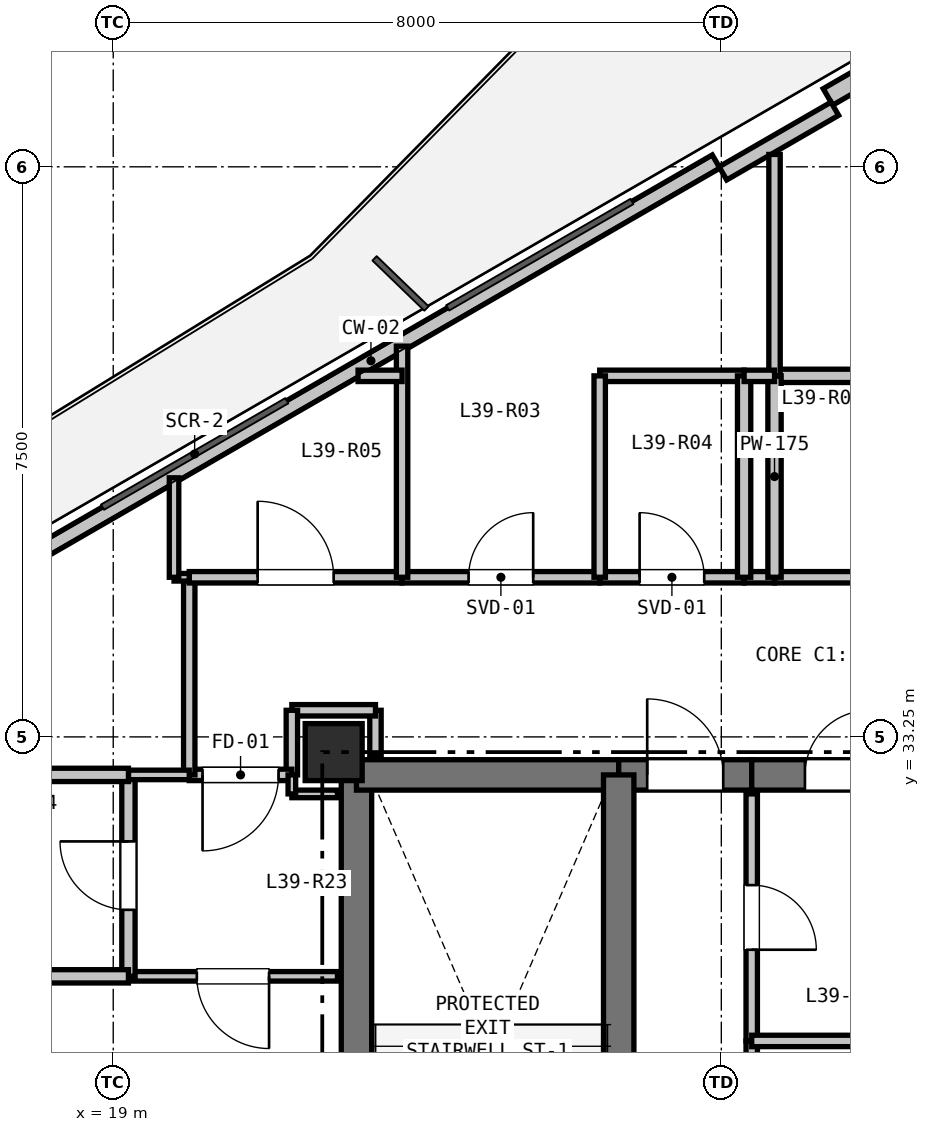
"""IFC4 building model, lengths in metres.
Left out: names, types, materials, properties, quantities, classifications, styles, units other than length and angle.
Written with IfcOpenShell. Run it as: python <this file> out.ifc"""

import sys

from ifc_helpers import new_model, si_unit, direction, frame, frame_2d, origin, origin_2d, place, context, subcontext, project, spatial, rectangle, extrude, element, fill, save


model = new_model("IFC4")
c1 = context("Model", 3, precision=1e-05, world=origin(), true_north=direction((0.0, 1.0)))
c2 = subcontext(c1, "Body", "Model", "MODEL_VIEW")
j1 = project(units=[si_unit("LENGTHUNIT", "METRE"), si_unit("PLANEANGLEUNIT", "RADIAN")], contexts=[c1])
p1 = place(None, origin())
s1 = spatial("IfcSite", under=j1, at=p1, CompositionType="ELEMENT")
p2 = place(p1, origin())
s2 = spatial("IfcBuilding", under=s1, at=p2, CompositionType="ELEMENT")
p3 = place(p2, frame((0.0, 0.0, 141.0)))
s3 = spatial("IfcBuildingStorey", under=s2, at=p3, CompositionType="ELEMENT", Elevation=141.0)
p4 = place(p3, frame((21.9, 33.05, 0.0), z_axis=(0.0, 0.0, 1.0), x_axis=(1.0, 0.0, 0.0)))
e1 = element("IfcColumn", 1, at=p4, inside=s3, PredefinedType="COLUMN", context=c2, shape_type="SweptSolid", body=[
    extrude(rectangle(XDim=0.75, YDim=0.75, at=origin_2d()), origin(), (0.0, 0.0, 1.0), 3.3),
])
p5 = place(p3, frame((17.85, 35.577, 0.0), z_axis=(0.0, 0.0, 1.0), x_axis=(0.866026619769, 0.499997893847, 0.0)))
e2 = element("IfcWall", 2, at=p5, inside=s3, PredefinedType="PARAPET", context=c2, shape_type="SweptSolid", body=[
    extrude(rectangle(XDim=10.486, YDim=0.2, at=frame_2d((5.243, 0.0))), origin(), (0.0, 0.0, 1.0), 0.2),
])
p6 = place(p3, frame((28.403, 41.67, 0.0), z_axis=(0.0, 0.0, 1.0), x_axis=(0.86602239209, 0.500005216371, 0.0)))
e3 = element("IfcWall", 3, at=p6, inside=s3, PredefinedType="SOLIDWALL", context=c2, shape_type="SweptSolid", body=[
    extrude(rectangle(XDim=11.186, YDim=0.25, at=frame_2d((5.593, 0.0))), origin(), (0.0, 0.0, 1.0), 2.68),
])
p7 = place(p6, frame((2.88, 0.0, 0.9)))
e4 = element("IfcOpeningElement", 4, at=p7, cuts=e3, PredefinedType="OPENING", context=c2, shape_type="SweptSolid", body=[
    extrude(rectangle(XDim=0.9, YDim=1.4, at=frame_2d((0.45, 0.7))), frame((0.0, 0.135, 0.0), z_axis=(0.0, -1.0, 0.0), x_axis=(1.0, 0.0, 0.0)), (0.0, 0.0, 1.0), 0.27),
])
p8 = place(p3, frame((27.021, 40.664, 0.0), z_axis=(0.0, 0.0, 1.0), x_axis=(0.86605165483, 0.499954529098, 0.0)))
e5 = element("IfcWall", 5, at=p8, inside=s3, PredefinedType="PARAPET", context=c2, shape_type="SweptSolid", body=[
    extrude(rectangle(XDim=1.7, YDim=0.2, at=frame_2d((0.85, 0.0))), origin(), (0.0, 0.0, 1.0), 2.68),
])
p9 = place(p3, frame((22.2, 25.4, 0.0), z_axis=(0.0, 0.0, 1.0), x_axis=(0.0, 1.0, 0.0)))
e6 = element("IfcWall", 6, at=p9, inside=s3, PredefinedType="SHEAR", context=c2, shape_type="SweptSolid", body=[
    extrude(rectangle(XDim=7.35, YDim=0.4, at=frame_2d((3.675, 0.0))), origin(), (0.0, 0.0, 1.0), 3.06),
])
p10 = place(p3, frame((22.2, 32.75, 0.0), z_axis=(0.0, 0.0, 1.0), x_axis=(1.0, 0.0, 0.0)))
e7 = element("IfcWall", 7, at=p10, inside=s3, PredefinedType="SHEAR", context=c2, shape_type="SweptSolid", body=[
    extrude(rectangle(XDim=3.45, YDim=0.4, at=frame_2d((1.725, 0.0))), origin(), (0.0, 0.0, 1.0), 3.06),
])
p11 = place(p3, frame((25.65, 32.75, 0.0), z_axis=(0.0, 0.0, 1.0), x_axis=(1.0, 0.0, 0.0)))
e8 = element("IfcWall", 8, at=p11, inside=s3, PredefinedType="SHEAR", context=c2, shape_type="SweptSolid", body=[
    extrude(rectangle(XDim=1.75, YDim=0.4, at=frame_2d((0.875, 0.0))), origin(), (0.0, 0.0, 1.0), 3.06),
])
p12 = place(p11, frame((0.375, 0.0, 0.0)))
e9 = element("IfcOpeningElement", 9, at=p12, cuts=e8, PredefinedType="OPENING", context=c2, shape_type="SweptSolid", body=[
    extrude(rectangle(XDim=1.0, YDim=2.15, at=frame_2d((0.5, 1.075))), frame((0.0, 0.21, 0.0), z_axis=(0.0, -1.0, 0.0), x_axis=(1.0, 0.0, 0.0)), (0.0, 0.0, 1.0), 0.42),
])
p13 = place(p3, frame((27.4, 32.75, 0.0), z_axis=(0.0, 0.0, 1.0), x_axis=(1.0, 0.0, 0.0)))
e10 = element("IfcWall", 10, at=p13, inside=s3, PredefinedType="SHEAR", context=c2, shape_type="SweptSolid", body=[
    extrude(rectangle(XDim=2.25, YDim=0.4, at=frame_2d((1.125, 0.0))), origin(), (0.0, 0.0, 1.0), 3.06),
])
p14 = place(p13, frame((0.7, 0.0, 0.0)))
e11 = element("IfcOpeningElement", 11, at=p14, cuts=e10, PredefinedType="OPENING", context=c2, shape_type="SweptSolid", body=[
    extrude(rectangle(XDim=0.85, YDim=2.1, at=frame_2d((0.425, 1.05))), frame((0.0, 0.21, 0.0), z_axis=(0.0, -1.0, 0.0), x_axis=(1.0, 0.0, 0.0)), (0.0, 0.0, 1.0), 0.42),
])
p15 = place(p3, frame((25.65, 27.95, 0.0), z_axis=(0.0, 0.0, 1.0), x_axis=(0.0, 1.0, 0.0)))
e12 = element("IfcWall", 12, at=p15, inside=s3, PredefinedType="SHEAR", context=c2, shape_type="SweptSolid", body=[
    extrude(rectangle(XDim=4.8, YDim=0.4, at=frame_2d((2.4, 0.0))), origin(), (0.0, 0.0, 1.0), 3.06),
])
p16 = place(p3, frame((27.4, 32.5, 0.0), z_axis=(0.0, 0.0, 1.0), x_axis=(0.0, -1.0, 0.0)))
e13 = element("IfcWall", 13, at=p16, inside=s3, PredefinedType="PARTITIONING", context=c2, shape_type="SweptSolid", body=[
    extrude(rectangle(XDim=3.25, YDim=0.15, at=frame_2d((1.625, 0.0))), origin(), (0.0, 0.0, 1.0), 3.06),
])
p17 = place(p16, frame((1.2, 0.0, 0.0)))
e14 = element("IfcOpeningElement", 14, at=p17, cuts=e13, PredefinedType="OPENING", context=c2, shape_type="SweptSolid", body=[
    extrude(rectangle(XDim=0.85, YDim=2.1, at=frame_2d((0.425, 1.05))), frame((0.0, 0.085, 0.0), z_axis=(0.0, -1.0, 0.0), x_axis=(1.0, 0.0, 0.0)), (0.0, 0.0, 1.0), 0.17),
])
p18 = place(p3, frame((27.4, 29.25, 0.0), z_axis=(0.0, 0.0, 1.0), x_axis=(0.0, -1.0, 0.0)))
e15 = element("IfcWall", 15, at=p18, inside=s3, PredefinedType="PARTITIONING", context=c2, shape_type="SweptSolid", body=[
    extrude(rectangle(XDim=1.3, YDim=0.15, at=frame_2d((0.65, 0.0))), origin(), (0.0, 0.0, 1.0), 3.06),
])
p19 = place(p3, frame((22.45, 33.0, 0.0), z_axis=(0.0, 0.0, 1.0), x_axis=(0.0, 1.0, 0.0)))
e16 = element("IfcWall", 16, at=p19, inside=s3, PredefinedType="PARTITIONING", context=c2, shape_type="SweptSolid", body=[
    extrude(rectangle(XDim=0.6, YDim=0.15, at=frame_2d((0.3, 0.0))), origin(), (0.0, 0.0, 1.0), 2.585),
])
p20 = place(p3, frame((22.45, 33.6, 0.0), z_axis=(0.0, 0.0, 1.0), x_axis=(-1.0, 0.0, 0.0)))
e17 = element("IfcWall", 17, at=p20, inside=s3, PredefinedType="PARTITIONING", context=c2, shape_type="SweptSolid", body=[
    extrude(rectangle(XDim=1.1, YDim=0.15, at=frame_2d((0.55, 0.0))), origin(), (0.0, 0.0, 1.0), 3.06),
])
p21 = place(p3, frame((21.35, 33.6, 0.0), z_axis=(0.0, 0.0, 1.0), x_axis=(0.0, -1.0, 0.0)))
e18 = element("IfcWall", 18, at=p21, inside=s3, PredefinedType="PARTITIONING", context=c2, shape_type="SweptSolid", body=[
    extrude(rectangle(XDim=0.85, YDim=0.15, at=frame_2d((0.425, 0.0))), origin(), (0.0, 0.0, 1.0), 2.433),
])
p22 = place(p3, frame((21.35, 32.75, 0.0), z_axis=(0.0, 0.0, 1.0), x_axis=(-1.0, 0.0, 0.0)))
e19 = element("IfcWall", 19, at=p22, inside=s3, PredefinedType="PARTITIONING", context=c2, shape_type="SweptSolid", body=[
    extrude(rectangle(XDim=1.35, YDim=0.15, at=frame_2d((0.675, 0.0))), origin(), (0.0, 0.0, 1.0), 2.433),
])
p23 = place(p22, frame((0.175, 0.0, 0.0)))
e20 = element("IfcOpeningElement", 20, at=p23, cuts=e19, PredefinedType="OPENING", context=c2, shape_type="SweptSolid", body=[
    extrude(rectangle(XDim=1.0, YDim=2.15, at=frame_2d((0.5, 1.075))), frame((0.0, 0.085, 0.0), z_axis=(0.0, -1.0, 0.0), x_axis=(1.0, 0.0, 0.0)), (0.0, 0.0, 1.0), 0.17),
])
p24 = place(p3, frame((20.0, 32.75, 0.0), z_axis=(0.0, 0.0, 1.0), x_axis=(0.0, 1.0, 0.0)))
e21 = element("IfcWall", 21, at=p24, inside=s3, PredefinedType="PARTITIONING", context=c2, shape_type="SweptSolid", body=[
    extrude(rectangle(XDim=2.6, YDim=0.15, at=frame_2d((1.3, 0.0))), origin(), (0.0, 0.0, 1.0), 2.433),
])
p25 = place(p3, frame((20.0, 35.35, 0.0), z_axis=(0.0, 0.0, 1.0), x_axis=(1.0, 0.0, 0.0)))
e22 = element("IfcWall", 22, at=p25, inside=s3, PredefinedType="PARTITIONING", context=c2, shape_type="SweptSolid", body=[
    extrude(rectangle(XDim=2.8, YDim=0.15, at=frame_2d((1.4, 0.0))), origin(), (0.0, 0.0, 1.0), 3.06),
])
p26 = place(p25, frame((0.9, 0.0, 0.0)))
e23 = element("IfcOpeningElement", 23, at=p26, cuts=e22, PredefinedType="OPENING", context=c2, shape_type="SweptSolid", body=[
    extrude(rectangle(XDim=1.0, YDim=2.15, at=frame_2d((0.5, 1.075))), frame((0.0, 0.085, 0.0), z_axis=(0.0, -1.0, 0.0), x_axis=(1.0, 0.0, 0.0)), (0.0, 0.0, 1.0), 0.17),
])
p27 = place(p3, frame((22.8, 35.35, 0.0), z_axis=(0.0, 0.0, 1.0), x_axis=(1.0, 0.0, 0.0)))
e24 = element("IfcWall", 24, at=p27, inside=s3, PredefinedType="PARTITIONING", context=c2, shape_type="SweptSolid", body=[
    extrude(rectangle(XDim=2.6, YDim=0.15, at=frame_2d((1.3, 0.0))), origin(), (0.0, 0.0, 1.0), 3.06),
])
p28 = place(p27, frame((0.875, 0.0, 0.0)))
e25 = element("IfcOpeningElement", 25, at=p28, cuts=e24, PredefinedType="OPENING", context=c2, shape_type="SweptSolid", body=[
    extrude(rectangle(XDim=0.85, YDim=2.1, at=frame_2d((0.425, 1.05))), frame((0.0, 0.085, 0.0), z_axis=(0.0, -1.0, 0.0), x_axis=(1.0, 0.0, 0.0)), (0.0, 0.0, 1.0), 0.17),
])
p29 = place(p3, frame((25.4, 35.35, 0.0), z_axis=(0.0, 0.0, 1.0), x_axis=(1.0, 0.0, 0.0)))
e26 = element("IfcWall", 26, at=p29, inside=s3, PredefinedType="PARTITIONING", context=c2, shape_type="SweptSolid", body=[
    extrude(rectangle(XDim=1.9, YDim=0.15, at=frame_2d((0.95, 0.0))), origin(), (0.0, 0.0, 1.0), 3.06),
])
p30 = place(p29, frame((0.525, 0.0, 0.0)))
e27 = element("IfcOpeningElement", 27, at=p30, cuts=e26, PredefinedType="OPENING", context=c2, shape_type="SweptSolid", body=[
    extrude(rectangle(XDim=0.85, YDim=2.1, at=frame_2d((0.425, 1.05))), frame((0.0, 0.085, 0.0), z_axis=(0.0, -1.0, 0.0), x_axis=(1.0, 0.0, 0.0)), (0.0, 0.0, 1.0), 0.17),
])
p31 = place(p3, frame((27.3, 35.35, 0.0), z_axis=(0.0, 0.0, 1.0), x_axis=(1.0, 0.0, 0.0)))
e28 = element("IfcWall", 28, at=p31, inside=s3, PredefinedType="PARTITIONING", context=c2, shape_type="SweptSolid", body=[
    extrude(rectangle(XDim=0.4, YDim=0.15, at=frame_2d((0.2, 0.0))), origin(), (0.0, 0.0, 1.0), 3.06),
])
p32 = place(p3, frame((27.7, 35.35, 0.0), z_axis=(0.0, 0.0, 1.0), x_axis=(1.0, 0.0, 0.0)))
e29 = element("IfcWall", 29, at=p32, inside=s3, PredefinedType="PARTITIONING", context=c2, shape_type="SweptSolid", body=[
    extrude(rectangle(XDim=2.0, YDim=0.15, at=frame_2d((1.0, 0.0))), origin(), (0.0, 0.0, 1.0), 3.06),
])
p33 = place(p3, frame((21.35, 32.5, 0.0), z_axis=(0.0, 0.0, 1.0), x_axis=(1.0, 0.0, 0.0)))
e30 = element("IfcWall", 30, at=p33, inside=s3, PredefinedType="PARTITIONING", context=c2, shape_type="SweptSolid", body=[
    extrude(rectangle(XDim=0.6, YDim=0.1, at=frame_2d((0.3, 0.0))), origin(), (0.0, 0.0, 1.0), 2.585),
])
p34 = place(p3, frame((21.95, 30.1, 0.0), z_axis=(0.0, 0.0, 1.0), x_axis=(-1.0, 0.0, 0.0)))
e31 = element("IfcWall", 31, at=p34, inside=s3, PredefinedType="PARTITIONING", context=c2, shape_type="SweptSolid", body=[
    extrude(rectangle(XDim=2.75, YDim=0.125, at=frame_2d((1.375, 0.0))), origin(), (0.0, 0.0, 1.0), 2.585),
])
p35 = place(p34, frame((0.9, 0.0, 0.0)))
e32 = element("IfcOpeningElement", 32, at=p35, cuts=e31, PredefinedType="OPENING", context=c2, shape_type="SweptSolid", body=[
    extrude(rectangle(XDim=0.95, YDim=2.1, at=frame_2d((0.475, 1.05))), frame((0.0, 0.073, 0.0), z_axis=(0.0, -1.0, 0.0), x_axis=(1.0, 0.0, 0.0)), (0.0, 0.0, 1.0), 0.145),
])
p36 = place(p3, frame((19.2, 30.1, 0.0), z_axis=(0.0, 0.0, 1.0), x_axis=(0.0, 1.0, 0.0)))
e33 = element("IfcWall", 33, at=p36, inside=s3, PredefinedType="PLUMBINGWALL", context=c2, shape_type="SweptSolid", body=[
    extrude(rectangle(XDim=2.65, YDim=0.175, at=frame_2d((1.325, 0.0))), origin(), (0.0, 0.0, 1.0), 2.433),
])
p37 = place(p36, frame((0.875, 0.0, 0.0)))
e34 = element("IfcOpeningElement", 34, at=p37, cuts=e33, PredefinedType="OPENING", context=c2, shape_type="SweptSolid", body=[
    extrude(rectangle(XDim=0.9, YDim=2.1, at=frame_2d((0.45, 1.05))), frame((0.0, 0.097, 0.0), z_axis=(0.0, -1.0, 0.0), x_axis=(1.0, 0.0, 0.0)), (0.0, 0.0, 1.0), 0.195),
])
p38 = place(p3, frame((19.2, 32.75, 0.0), z_axis=(0.0, 0.0, 1.0), x_axis=(1.0, 0.0, 0.0)))
e35 = element("IfcWall", 35, at=p38, inside=s3, PredefinedType="PARTITIONING", context=c2, shape_type="SweptSolid", body=[
    extrude(rectangle(XDim=0.8, YDim=0.125, at=frame_2d((0.4, 0.0))), origin(), (0.0, 0.0, 1.0), 2.433),
])
p39 = place(p3, frame((21.35, 32.75, 0.0), z_axis=(0.0, 0.0, 1.0), x_axis=(0.0, -1.0, 0.0)))
e36 = element("IfcWall", 36, at=p39, inside=s3, PredefinedType="PARTITIONING", context=c2, shape_type="SweptSolid", body=[
    extrude(rectangle(XDim=0.25, YDim=0.1, at=frame_2d((0.125, 0.0))), origin(), (0.0, 0.0, 1.0), 3.06),
])
p40 = place(p3, frame((25.4, 38.0, 0.0), z_axis=(0.0, 0.0, 1.0), x_axis=(1.0, 0.0, 0.0)))
e37 = element("IfcWall", 37, at=p40, inside=s3, PredefinedType="PARTITIONING", context=c2, shape_type="SweptSolid", body=[
    extrude(rectangle(XDim=1.9, YDim=0.15, at=frame_2d((0.95, 0.0))), origin(), (0.0, 0.0, 1.0), 3.06),
])
p41 = place(p3, frame((27.3, 38.0, 0.0), z_axis=(0.0, 0.0, 1.0), x_axis=(0.0, -1.0, 0.0)))
e38 = element("IfcWall", 38, at=p41, inside=s3, PredefinedType="PLUMBINGWALL", context=c2, shape_type="SweptSolid", body=[
    extrude(rectangle(XDim=2.65, YDim=0.175, at=frame_2d((1.325, 0.0))), origin(), (0.0, 0.0, 1.0), 3.06),
])
p42 = place(p3, frame((25.4, 35.35, 0.0), z_axis=(0.0, 0.0, 1.0), x_axis=(0.0, 1.0, 0.0)))
e39 = element("IfcWall", 39, at=p42, inside=s3, PredefinedType="PARTITIONING", context=c2, shape_type="SweptSolid", body=[
    extrude(rectangle(XDim=2.65, YDim=0.15, at=frame_2d((1.325, 0.0))), origin(), (0.0, 0.0, 1.0), 3.06),
])
p43 = place(p3, frame((27.7, 38.0, 0.0), z_axis=(0.0, 0.0, 1.0), x_axis=(1.0, 0.0, 0.0)))
e40 = element("IfcWall", 40, at=p43, inside=s3, PredefinedType="PLUMBINGWALL", context=c2, shape_type="SweptSolid", body=[
    extrude(rectangle(XDim=2.0, YDim=0.175, at=frame_2d((1.0, 0.0))), origin(), (0.0, 0.0, 1.0), 3.06),
])
p44 = place(p3, frame((27.7, 35.35, 0.0), z_axis=(0.0, 0.0, 1.0), x_axis=(0.0, 1.0, 0.0)))
e41 = element("IfcWall", 41, at=p44, inside=s3, PredefinedType="PLUMBINGWALL", context=c2, shape_type="SweptSolid", body=[
    extrude(rectangle(XDim=2.65, YDim=0.175, at=frame_2d((1.325, 0.0))), origin(), (0.0, 0.0, 1.0), 3.06),
])
p45 = place(p3, frame((17.0, 32.75, 0.0), z_axis=(0.0, 0.0, 1.0), x_axis=(1.0, 0.0, 0.0)))
e42 = element("IfcWall", 42, at=p45, inside=s3, PredefinedType="PLUMBINGWALL", context=c2, shape_type="SweptSolid", body=[
    extrude(rectangle(XDim=2.2, YDim=0.175, at=frame_2d((1.1, 0.0))), origin(), (0.0, 0.0, 1.0), 2.433),
])
p46 = place(p3, frame((19.2, 30.1, 0.0), z_axis=(0.0, 0.0, 1.0), x_axis=(-1.0, 0.0, 0.0)))
e43 = element("IfcWall", 43, at=p46, inside=s3, PredefinedType="PLUMBINGWALL", context=c2, shape_type="SweptSolid", body=[
    extrude(rectangle(XDim=2.2, YDim=0.175, at=frame_2d((1.1, 0.0))), origin(), (0.0, 0.0, 1.0), 3.06),
])
p47 = place(p3, frame((32.1, 29.25, 0.0), z_axis=(0.0, 0.0, 1.0), x_axis=(-1.0, 0.0, 0.0)))
e44 = element("IfcWall", 44, at=p47, inside=s3, PredefinedType="PARTITIONING", context=c2, shape_type="SweptSolid", body=[
    extrude(rectangle(XDim=4.7, YDim=0.15, at=frame_2d((2.35, 0.0))), origin(), (0.0, 0.0, 1.0), 3.06),
])
p48 = place(p3, frame((27.7, 40.913, 0.0), z_axis=(0.0, 0.0, 1.0), x_axis=(0.0, -1.0, 0.0)))
e45 = element("IfcWall", 45, at=p48, inside=s3, PredefinedType="PARTITIONING", context=c2, shape_type="SweptSolid", body=[
    extrude(rectangle(XDim=2.913, YDim=0.15, at=frame_2d((1.456, 0.0))), origin(), (0.0, 0.0, 1.0), 2.365),
])
p49 = place(p3, frame((27.7, 38.0, 0.0), z_axis=(0.0, 0.0, 1.0), x_axis=(-1.0, 0.0, 0.0)))
e46 = element("IfcWall", 46, at=p49, inside=s3, PredefinedType="PARTITIONING", context=c2, shape_type="SweptSolid", body=[
    extrude(rectangle(XDim=0.4, YDim=0.15, at=frame_2d((0.2, 0.0))), origin(), (0.0, 0.0, 1.0), 3.06),
])
p50 = place(p3, frame((22.8, 35.35, 0.0), z_axis=(0.0, 0.0, 1.0), x_axis=(0.0, 1.0, 0.0)))
e47 = element("IfcWall", 47, at=p50, inside=s3, PredefinedType="PARTITIONING", context=c2, shape_type="SweptSolid", body=[
    extrude(rectangle(XDim=3.041, YDim=0.15, at=frame_2d((1.52, 0.0))), origin(), (0.0, 0.0, 1.0), 2.365),
])
p51 = place(p3, frame((22.8, 38.0, 0.0), z_axis=(0.0, 0.0, 1.0), x_axis=(-1.0, 0.0, 0.0)))
e48 = element("IfcWall", 48, at=p51, inside=s3, PredefinedType="PARTITIONING", context=c2, shape_type="SweptSolid", body=[
    extrude(rectangle(XDim=0.579, YDim=0.15, at=frame_2d((0.29, 0.0))), origin(), (0.0, 0.0, 1.0), 3.06),
])
p52 = place(p3, frame((20.0, 35.35, 0.0), z_axis=(0.0, 0.0, 1.0), x_axis=(-1.0, 0.0, 0.0)))
e49 = element("IfcWall", 49, at=p52, inside=s3, PredefinedType="PARTITIONING", context=c2, shape_type="SweptSolid", body=[
    extrude(rectangle(XDim=0.2, YDim=0.1, at=frame_2d((0.1, 0.0))), origin(), (0.0, 0.0, 1.0), 3.06),
])
p53 = place(p3, frame((19.8, 35.35, 0.0), z_axis=(0.0, 0.0, 1.0), x_axis=(0.0, 1.0, 0.0)))
e50 = element("IfcWall", 50, at=p53, inside=s3, PredefinedType="PARTITIONING", context=c2, shape_type="SweptSolid", body=[
    extrude(rectangle(XDim=1.309, YDim=0.125, at=frame_2d((0.654, 0.0))), origin(), (0.0, 0.0, 1.0), 2.365),
])
p54 = place(p12, origin())
e51 = element("IfcDoor", 51, at=p54, inside=s3, OperationType="SINGLE_SWING_LEFT", PredefinedType="DOOR", context=c2, shape_type="SweptSolid", body=[
    extrude(rectangle(XDim=1.0, YDim=2.15, at=frame_2d((0.5, 1.075))), frame((0.0, 0.025, 0.0), z_axis=(0.0, -1.0, 0.0), x_axis=(1.0, 0.0, 0.0)), (0.0, 0.0, 1.0), 0.05),
])
fill(e9, e51)
p55 = place(p17, origin())
e52 = element("IfcDoor", 52, at=p55, inside=s3, OperationType="SINGLE_SWING_RIGHT", PredefinedType="DOOR", context=c2, shape_type="SweptSolid", body=[
    extrude(rectangle(XDim=0.85, YDim=2.1, at=frame_2d((0.425, 1.05))), frame((0.0, 0.025, 0.0), z_axis=(0.0, -1.0, 0.0), x_axis=(1.0, 0.0, 0.0)), (0.0, 0.0, 1.0), 0.05),
])
fill(e14, e52)
p56 = place(p23, origin())
e53 = element("IfcDoor", 53, at=p56, inside=s3, OperationType="SINGLE_SWING_RIGHT", PredefinedType="DOOR", context=c2, shape_type="SweptSolid", body=[
    extrude(rectangle(XDim=1.0, YDim=2.15, at=frame_2d((0.5, 1.075))), frame((0.0, 0.025, 0.0), z_axis=(0.0, -1.0, 0.0), x_axis=(1.0, 0.0, 0.0)), (0.0, 0.0, 1.0), 0.05),
])
fill(e20, e53)
p57 = place(p30, origin())
e54 = element("IfcDoor", 54, at=p57, inside=s3, OperationType="SINGLE_SWING_LEFT", PredefinedType="DOOR", context=c2, shape_type="SweptSolid", body=[
    extrude(rectangle(XDim=0.85, YDim=2.1, at=frame_2d((0.425, 1.05))), frame((0.0, 0.025, 0.0), z_axis=(0.0, -1.0, 0.0), x_axis=(1.0, 0.0, 0.0)), (0.0, 0.0, 1.0), 0.05),
])
fill(e27, e54)
p58 = place(p14, origin())
e55 = element("IfcDoor", 55, at=p58, inside=s3, OperationType="SINGLE_SWING_RIGHT", PredefinedType="DOOR", context=c2, shape_type="SweptSolid", body=[
    extrude(rectangle(XDim=0.85, YDim=2.1, at=frame_2d((0.425, 1.05))), frame((0.0, 0.025, 0.0), z_axis=(0.0, -1.0, 0.0), x_axis=(1.0, 0.0, 0.0)), (0.0, 0.0, 1.0), 0.05),
])
fill(e11, e55)
p59 = place(p28, origin())
e56 = element("IfcDoor", 56, at=p59, inside=s3, OperationType="SINGLE_SWING_RIGHT", PredefinedType="DOOR", context=c2, shape_type="SweptSolid", body=[
    extrude(rectangle(XDim=0.85, YDim=2.1, at=frame_2d((0.425, 1.05))), frame((0.0, 0.025, 0.0), z_axis=(0.0, -1.0, 0.0), x_axis=(1.0, 0.0, 0.0)), (0.0, 0.0, 1.0), 0.05),
])
fill(e25, e56)
p60 = place(p26, origin())
e57 = element("IfcDoor", 57, at=p60, inside=s3, OperationType="SINGLE_SWING_LEFT", PredefinedType="DOOR", context=c2, shape_type="SweptSolid", body=[
    extrude(rectangle(XDim=1.0, YDim=2.15, at=frame_2d((0.5, 1.075))), frame((0.0, 0.025, 0.0), z_axis=(0.0, -1.0, 0.0), x_axis=(1.0, 0.0, 0.0)), (0.0, 0.0, 1.0), 0.05),
])
fill(e23, e57)
p61 = place(p37, origin())
e58 = element("IfcDoor", 58, at=p61, inside=s3, OperationType="SINGLE_SWING_RIGHT", PredefinedType="DOOR", context=c2, shape_type="SweptSolid", body=[
    extrude(rectangle(XDim=0.9, YDim=2.1, at=frame_2d((0.45, 1.05))), frame((0.0, 0.025, 0.0), z_axis=(0.0, -1.0, 0.0), x_axis=(1.0, 0.0, 0.0)), (0.0, 0.0, 1.0), 0.05),
])
fill(e34, e58)
p62 = place(p35, origin())
e59 = element("IfcDoor", 59, at=p62, inside=s3, OperationType="SINGLE_SWING_LEFT", PredefinedType="DOOR", context=c2, shape_type="SweptSolid", body=[
    extrude(rectangle(XDim=0.95, YDim=2.1, at=frame_2d((0.475, 1.05))), frame((0.0, 0.025, 0.0), z_axis=(0.0, -1.0, 0.0), x_axis=(1.0, 0.0, 0.0)), (0.0, 0.0, 1.0), 0.05),
])
fill(e32, e59)
save(model, sys.argv[1])
